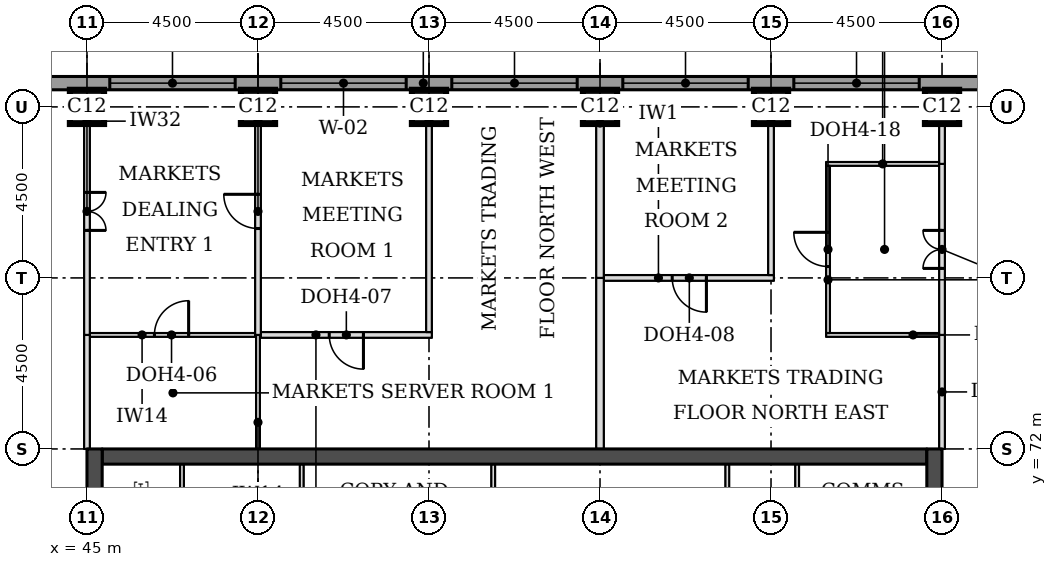
"""IFC4 building model, lengths in metres.
Left out: names, types, materials, properties, quantities, classifications, styles, units other than length and angle.
Written with IfcOpenShell. Run it as: python <this file> out.ifc"""

import sys

from ifc_helpers import new_model, si_unit, direction, frame, frame_2d, origin, origin_2d, place, context, subcontext, project, spatial, rectangle, extrude, element, fill, save


model = new_model("IFC4")
c1 = context("Model", 3, precision=1e-05, world=origin(), true_north=direction((0.0, 1.0)))
c2 = subcontext(c1, "Body", "Model", "MODEL_VIEW")
j1 = project(units=[si_unit("LENGTHUNIT", "METRE"), si_unit("PLANEANGLEUNIT", "RADIAN")], contexts=[c1])
p1 = place(None, origin())
s1 = spatial("IfcSite", under=j1, at=p1, CompositionType="ELEMENT")
p2 = place(p1, origin())
s2 = spatial("IfcBuilding", under=s1, at=p2, CompositionType="ELEMENT")
p3 = place(p2, frame((0.0, 0.0, 169.9)))
s3 = spatial("IfcBuildingStorey", under=s2, at=p3, CompositionType="ELEMENT", Elevation=169.9)
for number, where, z_axis, x_axis in (
    (1, (45.0, 81.0, 0.0), (0.0, 0.0, 1.0), (1.0, 0.0, 0.0)),
    (2, (49.5, 81.0, 0.0), (0.0, 0.0, 1.0), (1.0, 0.0, 0.0)),
    (3, (54.0, 81.0, 0.0), (0.0, 0.0, 1.0), (1.0, 0.0, 0.0)),
    (4, (58.5, 81.0, 0.0), (0.0, 0.0, 1.0), (1.0, 0.0, 0.0)),
    (5, (63.0, 81.0, 0.0), (0.0, 0.0, 1.0), (1.0, 0.0, 0.0)),
    (6, (67.5, 81.0, 0.0), (0.0, 0.0, 1.0), (1.0, 0.0, 0.0)),
):
    element("IfcColumn", number, at=place(p3, frame(where, z_axis=z_axis, x_axis=x_axis)), inside=s3, PredefinedType="COLUMN", context=c2, shape_type="SweptSolid", body=[
        extrude(rectangle(XDim=0.9, YDim=0.9, at=origin_2d()), origin(), (0.0, 0.0, 1.0), 3.7),
    ])
p4 = place(p3, frame((45.4, 71.8, 0.0), z_axis=(0.0, 0.0, 1.0), x_axis=(1.0, 0.0, 0.0)))
e7 = element("IfcWall", 7, at=p4, inside=s3, PredefinedType="SHEAR", context=c2, shape_type="SweptSolid", body=[
    extrude(rectangle(XDim=21.7, YDim=0.4, at=frame_2d((10.85, 0.0))), origin(), (0.0, 0.0, 1.0), 3.7),
])
p5 = place(p3, frame((45.2, 49.5, 0.0), z_axis=(0.0, 0.0, 1.0), x_axis=(0.0, 1.0, 0.0)))
e8 = element("IfcWall", 8, at=p5, inside=s3, PredefinedType="SHEAR", context=c2, shape_type="SweptSolid", body=[
    extrude(rectangle(XDim=22.5, YDim=0.4, at=frame_2d((11.25, 0.0))), origin(), (0.0, 0.0, 1.0), 3.7),
])
p6 = place(p5, frame((4.2, 0.0, 0.0)))
e9 = element("IfcOpeningElement", 9, at=p6, cuts=e8, PredefinedType="OPENING", context=c2, shape_type="SweptSolid", body=[
    extrude(rectangle(XDim=1.8, YDim=2.1, at=frame_2d((0.9, 1.05))), frame((0.0, 0.21, 0.0), z_axis=(0.0, -1.0, 0.0), x_axis=(1.0, 0.0, 0.0)), (0.0, 0.0, 1.0), 0.42),
])
p7 = place(p5, frame((6.9, 0.0, 0.0)))
e10 = element("IfcOpeningElement", 10, at=p7, cuts=e8, PredefinedType="OPENING", context=c2, shape_type="SweptSolid", body=[
    extrude(rectangle(XDim=1.1, YDim=2.1, at=frame_2d((0.55, 1.05))), frame((0.0, 0.21, 0.0), z_axis=(0.0, -1.0, 0.0), x_axis=(1.0, 0.0, 0.0)), (0.0, 0.0, 1.0), 0.42),
])
p8 = place(p5, frame((13.6, 0.0, 0.0)))
e11 = element("IfcOpeningElement", 11, at=p8, cuts=e8, PredefinedType="OPENING", context=c2, shape_type="SweptSolid", body=[
    extrude(rectangle(XDim=1.1, YDim=2.1, at=frame_2d((0.55, 1.05))), frame((0.0, 0.21, 0.0), z_axis=(0.0, -1.0, 0.0), x_axis=(1.0, 0.0, 0.0)), (0.0, 0.0, 1.0), 0.42),
])
p9 = place(p5, frame((16.5, 0.0, 0.0)))
e12 = element("IfcOpeningElement", 12, at=p9, cuts=e8, PredefinedType="OPENING", context=c2, shape_type="SweptSolid", body=[
    extrude(rectangle(XDim=1.8, YDim=2.1, at=frame_2d((0.9, 1.05))), frame((0.0, 0.21, 0.0), z_axis=(0.0, -1.0, 0.0), x_axis=(1.0, 0.0, 0.0)), (0.0, 0.0, 1.0), 0.42),
])
p10 = place(p3, frame((67.3, 49.5, 0.0), z_axis=(0.0, 0.0, 1.0), x_axis=(0.0, 1.0, 0.0)))
e13 = element("IfcWall", 13, at=p10, inside=s3, PredefinedType="SHEAR", context=c2, shape_type="SweptSolid", body=[
    extrude(rectangle(XDim=22.5, YDim=0.4, at=frame_2d((11.25, 0.0))), origin(), (0.0, 0.0, 1.0), 3.7),
])
p11 = place(p10, frame((4.2, 0.0, 0.0)))
e14 = element("IfcOpeningElement", 14, at=p11, cuts=e13, PredefinedType="OPENING", context=c2, shape_type="SweptSolid", body=[
    extrude(rectangle(XDim=1.8, YDim=2.1, at=frame_2d((0.9, 1.05))), frame((0.0, 0.21, 0.0), z_axis=(0.0, -1.0, 0.0), x_axis=(1.0, 0.0, 0.0)), (0.0, 0.0, 1.0), 0.42),
])
p12 = place(p10, frame((6.9, 0.0, 0.0)))
e15 = element("IfcOpeningElement", 15, at=p12, cuts=e13, PredefinedType="OPENING", context=c2, shape_type="SweptSolid", body=[
    extrude(rectangle(XDim=1.1, YDim=2.1, at=frame_2d((0.55, 1.05))), frame((0.0, 0.21, 0.0), z_axis=(0.0, -1.0, 0.0), x_axis=(1.0, 0.0, 0.0)), (0.0, 0.0, 1.0), 0.42),
])
p13 = place(p10, frame((13.6, 0.0, 0.0)))
e16 = element("IfcOpeningElement", 16, at=p13, cuts=e13, PredefinedType="OPENING", context=c2, shape_type="SweptSolid", body=[
    extrude(rectangle(XDim=1.1, YDim=2.1, at=frame_2d((0.55, 1.05))), frame((0.0, 0.21, 0.0), z_axis=(0.0, -1.0, 0.0), x_axis=(1.0, 0.0, 0.0)), (0.0, 0.0, 1.0), 0.42),
])
p14 = place(p10, frame((16.5, 0.0, 0.0)))
e17 = element("IfcOpeningElement", 17, at=p14, cuts=e13, PredefinedType="OPENING", context=c2, shape_type="SweptSolid", body=[
    extrude(rectangle(XDim=1.8, YDim=2.1, at=frame_2d((0.9, 1.05))), frame((0.0, 0.21, 0.0), z_axis=(0.0, -1.0, 0.0), x_axis=(1.0, 0.0, 0.0)), (0.0, 0.0, 1.0), 0.42),
])
p15 = place(p3, frame((72.331, 81.625, 0.0), z_axis=(0.0, 0.0, 1.0), x_axis=(-1.0, 0.0, 0.0)))
e18 = element("IfcWall", 18, at=p15, inside=s3, PredefinedType="STANDARD", context=c2, shape_type="SweptSolid", body=[
    extrude(rectangle(XDim=32.163, YDim=0.35, at=frame_2d((16.081, 0.0))), origin(), (0.0, 0.0, 1.0), 3.525),
])
p16 = place(p15, frame((5.431, 0.0, 0.9)))
e19 = element("IfcOpeningElement", 19, at=p16, cuts=e18, PredefinedType="OPENING", context=c2, shape_type="SweptSolid", body=[
    extrude(rectangle(XDim=3.3, YDim=1.9, at=frame_2d((1.65, 0.95))), frame((0.0, 0.185, 0.0), z_axis=(0.0, -1.0, 0.0), x_axis=(1.0, 0.0, 0.0)), (0.0, 0.0, 1.0), 0.37),
])
p17 = place(p15, frame((9.931, 0.0, 0.9)))
e20 = element("IfcOpeningElement", 20, at=p17, cuts=e18, PredefinedType="OPENING", context=c2, shape_type="SweptSolid", body=[
    extrude(rectangle(XDim=3.3, YDim=1.9, at=frame_2d((1.65, 0.95))), frame((0.0, 0.185, 0.0), z_axis=(0.0, -1.0, 0.0), x_axis=(1.0, 0.0, 0.0)), (0.0, 0.0, 1.0), 0.37),
])
p18 = place(p15, frame((14.431, 0.0, 0.9)))
e21 = element("IfcOpeningElement", 21, at=p18, cuts=e18, PredefinedType="OPENING", context=c2, shape_type="SweptSolid", body=[
    extrude(rectangle(XDim=3.3, YDim=1.9, at=frame_2d((1.65, 0.95))), frame((0.0, 0.185, 0.0), z_axis=(0.0, -1.0, 0.0), x_axis=(1.0, 0.0, 0.0)), (0.0, 0.0, 1.0), 0.37),
])
p19 = place(p15, frame((18.931, 0.0, 0.9)))
e22 = element("IfcOpeningElement", 22, at=p19, cuts=e18, PredefinedType="OPENING", context=c2, shape_type="SweptSolid", body=[
    extrude(rectangle(XDim=3.3, YDim=1.9, at=frame_2d((1.65, 0.95))), frame((0.0, 0.185, 0.0), z_axis=(0.0, -1.0, 0.0), x_axis=(1.0, 0.0, 0.0)), (0.0, 0.0, 1.0), 0.37),
])
p20 = place(p15, frame((23.431, 0.0, 0.9)))
e23 = element("IfcOpeningElement", 23, at=p20, cuts=e18, PredefinedType="OPENING", context=c2, shape_type="SweptSolid", body=[
    extrude(rectangle(XDim=3.3, YDim=1.9, at=frame_2d((1.65, 0.95))), frame((0.0, 0.185, 0.0), z_axis=(0.0, -1.0, 0.0), x_axis=(1.0, 0.0, 0.0)), (0.0, 0.0, 1.0), 0.37),
])
p21 = place(p3, frame((45.075, 75.0, 0.0), z_axis=(0.0, 0.0, 1.0), x_axis=(1.0, 0.0, 0.0)))
e24 = element("IfcWall", 24, at=p21, inside=s3, PredefinedType="PARTITIONING", context=c2, shape_type="SweptSolid", body=[
    extrude(rectangle(XDim=4.35, YDim=0.1, at=frame_2d((2.175, 0.0))), origin(), (0.0, 0.0, 1.0), 3.55),
])
p22 = place(p21, frame((1.7, 0.0, 0.0)))
e25 = element("IfcOpeningElement", 25, at=p22, cuts=e24, PredefinedType="OPENING", context=c2, shape_type="SweptSolid", body=[
    extrude(rectangle(XDim=0.9, YDim=2.1, at=frame_2d((0.45, 1.05))), frame((0.0, 0.06, 0.0), z_axis=(0.0, -1.0, 0.0), x_axis=(1.0, 0.0, 0.0)), (0.0, 0.0, 1.0), 0.12),
])
p23 = place(p3, frame((49.575, 75.0, 0.0), z_axis=(0.0, 0.0, 1.0), x_axis=(1.0, 0.0, 0.0)))
e26 = element("IfcWall", 26, at=p23, inside=s3, PredefinedType="PARTITIONING", context=c2, shape_type="SweptSolid", body=[
    extrude(rectangle(XDim=4.5, YDim=0.15, at=frame_2d((2.25, 0.0))), origin(), (0.0, 0.0, 1.0), 3.55),
])
p24 = place(p23, frame((1.8, 0.0, 0.0)))
e27 = element("IfcOpeningElement", 27, at=p24, cuts=e26, PredefinedType="OPENING", context=c2, shape_type="SweptSolid", body=[
    extrude(rectangle(XDim=0.9, YDim=2.1, at=frame_2d((0.45, 1.05))), frame((0.0, 0.085, 0.0), z_axis=(0.0, -1.0, 0.0), x_axis=(1.0, 0.0, 0.0)), (0.0, 0.0, 1.0), 0.17),
])
p25 = place(p3, frame((64.45, 75.0, 0.0), z_axis=(0.0, 0.0, 1.0), x_axis=(1.0, 0.0, 0.0)))
e28 = element("IfcWall", 28, at=p25, inside=s3, PredefinedType="PARTITIONING", context=c2, shape_type="SweptSolid", body=[
    extrude(rectangle(XDim=2.975, YDim=0.1, at=frame_2d((1.488, 0.0))), origin(), (0.0, 0.0, 1.0), 3.55),
])
p26 = place(p3, frame((58.6, 76.5, 0.0), z_axis=(0.0, 0.0, 1.0), x_axis=(1.0, 0.0, 0.0)))
e29 = element("IfcWall", 29, at=p26, inside=s3, PredefinedType="PARTITIONING", context=c2, shape_type="SweptSolid", body=[
    extrude(rectangle(XDim=4.475, YDim=0.15, at=frame_2d((2.237, 0.0))), origin(), (0.0, 0.0, 1.0), 3.55),
])
p27 = place(p26, frame((1.8, 0.0, 0.0)))
e30 = element("IfcOpeningElement", 30, at=p27, cuts=e29, PredefinedType="OPENING", context=c2, shape_type="SweptSolid", body=[
    extrude(rectangle(XDim=0.9, YDim=2.1, at=frame_2d((0.45, 1.05))), frame((0.0, 0.085, 0.0), z_axis=(0.0, -1.0, 0.0), x_axis=(1.0, 0.0, 0.0)), (0.0, 0.0, 1.0), 0.17),
])
p28 = place(p3, frame((64.45, 79.5, 0.0), z_axis=(0.0, 0.0, 1.0), x_axis=(1.0, 0.0, 0.0)))
e31 = element("IfcWall", 31, at=p28, inside=s3, PredefinedType="PARTITIONING", context=c2, shape_type="SweptSolid", body=[
    extrude(rectangle(XDim=2.975, YDim=0.1, at=frame_2d((1.488, 0.0))), origin(), (0.0, 0.0, 1.0), 3.55),
])
p29 = place(p3, frame((45.0, 72.0, 0.0), z_axis=(0.0, 0.0, 1.0), x_axis=(0.0, 1.0, 0.0)))
e32 = element("IfcWall", 32, at=p29, inside=s3, PredefinedType="PARTITIONING", context=c2, shape_type="SweptSolid", body=[
    extrude(rectangle(XDim=3.0, YDim=0.15, at=frame_2d((1.5, 0.0))), origin(), (0.0, 0.0, 1.0), 3.022),
])
p30 = place(p3, frame((49.5, 72.0, 0.0), z_axis=(0.0, 0.0, 1.0), x_axis=(0.0, 1.0, 0.0)))
e33 = element("IfcWall", 33, at=p30, inside=s3, PredefinedType="PARTITIONING", context=c2, shape_type="SweptSolid", body=[
    extrude(rectangle(XDim=3.0, YDim=0.1, at=frame_2d((1.5, 0.0))), origin(), (0.0, 0.0, 1.0), 3.55),
])
p31 = place(p3, frame((58.5, 72.0, 0.0), z_axis=(0.0, 0.0, 1.0), x_axis=(0.0, 1.0, 0.0)))
e34 = element("IfcWall", 34, at=p31, inside=s3, PredefinedType="PARTITIONING", context=c2, shape_type="SweptSolid", body=[
    extrude(rectangle(XDim=4.5, YDim=0.2, at=frame_2d((2.25, 0.0))), origin(), (0.0, 0.0, 1.0), 3.55),
])
p32 = place(p3, frame((67.5, 72.0, 0.0), z_axis=(0.0, 0.0, 1.0), x_axis=(0.0, 1.0, 0.0)))
e35 = element("IfcWall", 35, at=p32, inside=s3, PredefinedType="PARTITIONING", context=c2, shape_type="SweptSolid", body=[
    extrude(rectangle(XDim=3.0, YDim=0.15, at=frame_2d((1.5, 0.0))), origin(), (0.0, 0.0, 1.0), 3.022),
])
p33 = place(p3, frame((45.0, 75.0, 0.0), z_axis=(0.0, 0.0, 1.0), x_axis=(0.0, 1.0, 0.0)))
e36 = element("IfcWall", 36, at=p33, inside=s3, PredefinedType="PARTITIONING", context=c2, shape_type="SweptSolid", body=[
    extrude(rectangle(XDim=6.45, YDim=0.15, at=frame_2d((3.225, 0.0))), origin(), (0.0, 0.0, 1.0), 3.022),
])
p34 = place(p33, frame((2.75, 0.0, 0.0)))
e37 = element("IfcOpeningElement", 37, at=p34, cuts=e36, PredefinedType="OPENING", context=c2, shape_type="SweptSolid", body=[
    extrude(rectangle(XDim=1.0, YDim=2.1, at=frame_2d((0.5, 1.05))), frame((0.0, 0.085, 0.0), z_axis=(0.0, -1.0, 0.0), x_axis=(1.0, 0.0, 0.0)), (0.0, 0.0, 1.0), 0.17),
])
p35 = place(p3, frame((49.5, 75.0, 0.0), z_axis=(0.0, 0.0, 1.0), x_axis=(0.0, 1.0, 0.0)))
e38 = element("IfcWall", 38, at=p35, inside=s3, PredefinedType="PARTITIONING", context=c2, shape_type="SweptSolid", body=[
    extrude(rectangle(XDim=6.45, YDim=0.15, at=frame_2d((3.225, 0.0))), origin(), (0.0, 0.0, 1.0), 3.55),
])
p36 = place(p35, frame((2.8, 0.0, 0.0)))
e39 = element("IfcOpeningElement", 39, at=p36, cuts=e38, PredefinedType="OPENING", context=c2, shape_type="SweptSolid", body=[
    extrude(rectangle(XDim=0.9, YDim=2.1, at=frame_2d((0.45, 1.05))), frame((0.0, 0.085, 0.0), z_axis=(0.0, -1.0, 0.0), x_axis=(1.0, 0.0, 0.0)), (0.0, 0.0, 1.0), 0.17),
])
p37 = place(p3, frame((67.5, 75.0, 0.0), z_axis=(0.0, 0.0, 1.0), x_axis=(0.0, 1.0, 0.0)))
e40 = element("IfcWall", 40, at=p37, inside=s3, PredefinedType="PARTITIONING", context=c2, shape_type="SweptSolid", body=[
    extrude(rectangle(XDim=4.5, YDim=0.15, at=frame_2d((2.25, 0.0))), origin(), (0.0, 0.0, 1.0), 3.022),
])
p38 = place(p37, frame((1.75, 0.0, 0.0)))
e41 = element("IfcOpeningElement", 41, at=p38, cuts=e40, PredefinedType="OPENING", context=c2, shape_type="SweptSolid", body=[
    extrude(rectangle(XDim=1.0, YDim=2.1, at=frame_2d((0.5, 1.05))), frame((0.0, 0.085, 0.0), z_axis=(0.0, -1.0, 0.0), x_axis=(1.0, 0.0, 0.0)), (0.0, 0.0, 1.0), 0.17),
])
p39 = place(p3, frame((64.5, 75.05, 0.0), z_axis=(0.0, 0.0, 1.0), x_axis=(0.0, 1.0, 0.0)))
e42 = element("IfcWall", 42, at=p39, inside=s3, PredefinedType="PARTITIONING", context=c2, shape_type="SweptSolid", body=[
    extrude(rectangle(XDim=4.4, YDim=0.1, at=frame_2d((2.2, 0.0))), origin(), (0.0, 0.0, 1.0), 3.55),
])
p40 = place(p39, frame((1.75, 0.0, 0.0)))
e43 = element("IfcOpeningElement", 43, at=p40, cuts=e42, PredefinedType="OPENING", context=c2, shape_type="SweptSolid", body=[
    extrude(rectangle(XDim=0.9, YDim=2.1, at=frame_2d((0.45, 1.05))), frame((0.0, 0.06, 0.0), z_axis=(0.0, -1.0, 0.0), x_axis=(1.0, 0.0, 0.0)), (0.0, 0.0, 1.0), 0.12),
])
p41 = place(p3, frame((54.0, 75.075, 0.0), z_axis=(0.0, 0.0, 1.0), x_axis=(0.0, 1.0, 0.0)))
e44 = element("IfcWall", 44, at=p41, inside=s3, PredefinedType="PARTITIONING", context=c2, shape_type="SweptSolid", body=[
    extrude(rectangle(XDim=6.375, YDim=0.15, at=frame_2d((3.188, 0.0))), origin(), (0.0, 0.0, 1.0), 3.55),
])
p42 = place(p3, frame((58.5, 76.5, 0.0), z_axis=(0.0, 0.0, 1.0), x_axis=(0.0, 1.0, 0.0)))
e45 = element("IfcWall", 45, at=p42, inside=s3, PredefinedType="PARTITIONING", context=c2, shape_type="SweptSolid", body=[
    extrude(rectangle(XDim=4.95, YDim=0.2, at=frame_2d((2.475, 0.0))), origin(), (0.0, 0.0, 1.0), 3.55),
])
p43 = place(p3, frame((63.0, 76.575, 0.0), z_axis=(0.0, 0.0, 1.0), x_axis=(0.0, 1.0, 0.0)))
e46 = element("IfcWall", 46, at=p43, inside=s3, PredefinedType="PARTITIONING", context=c2, shape_type="SweptSolid", body=[
    extrude(rectangle(XDim=4.875, YDim=0.15, at=frame_2d((2.438, 0.0))), origin(), (0.0, 0.0, 1.0), 3.55),
])
p44 = place(p3, frame((67.5, 79.5, 0.0), z_axis=(0.0, 0.0, 1.0), x_axis=(0.0, 1.0, 0.0)))
e47 = element("IfcWall", 47, at=p44, inside=s3, PredefinedType="PARTITIONING", context=c2, shape_type="SweptSolid", body=[
    extrude(rectangle(XDim=1.95, YDim=0.15, at=frame_2d((0.975, 0.0))), origin(), (0.0, 0.0, 1.0), 3.022),
])
for number, where, z_axis, x_axis in (
    (48, (47.5, 68.5, 0.0), (0.0, 0.0, 1.0), (0.0, 1.0, 0.0)),
    (49, (50.65, 68.5, 0.0), (0.0, 0.0, 1.0), (0.0, 1.0, 0.0)),
    (50, (55.69, 68.5, 0.0), (0.0, 0.0, 1.0), (0.0, 1.0, 0.0)),
    (51, (61.85, 68.5, 0.0), (0.0, 0.0, 1.0), (0.0, 1.0, 0.0)),
    (52, (63.688, 68.5, 0.0), (0.0, 0.0, 1.0), (0.0, 1.0, 0.0)),
):
    element("IfcWall", number, at=place(p3, frame(where, z_axis=z_axis, x_axis=x_axis)), inside=s3, PredefinedType="PARTITIONING", context=c2, shape_type="SweptSolid", body=[
        extrude(rectangle(XDim=3.1, YDim=0.1, at=frame_2d((1.55, 0.0))), origin(), (0.0, 0.0, 1.0), 3.55),
    ])
p45 = place(p16, origin())
e53 = element("IfcWindow", 53, at=p45, inside=s3, PartitioningType="SINGLE_PANEL", PredefinedType="WINDOW", context=c2, shape_type="SweptSolid", body=[
    extrude(rectangle(XDim=3.3, YDim=1.9, at=frame_2d((1.65, 0.95))), frame((0.0, 0.085, 0.0), z_axis=(0.0, -1.0, 0.0), x_axis=(1.0, 0.0, 0.0)), (0.0, 0.0, 1.0), 0.06),
])
fill(e19, e53)
p46 = place(p17, origin())
e54 = element("IfcWindow", 54, at=p46, inside=s3, PartitioningType="SINGLE_PANEL", PredefinedType="WINDOW", context=c2, shape_type="SweptSolid", body=[
    extrude(rectangle(XDim=3.3, YDim=1.9, at=frame_2d((1.65, 0.95))), frame((0.0, 0.085, 0.0), z_axis=(0.0, -1.0, 0.0), x_axis=(1.0, 0.0, 0.0)), (0.0, 0.0, 1.0), 0.06),
])
fill(e20, e54)
p47 = place(p18, origin())
e55 = element("IfcWindow", 55, at=p47, inside=s3, PartitioningType="SINGLE_PANEL", PredefinedType="WINDOW", context=c2, shape_type="SweptSolid", body=[
    extrude(rectangle(XDim=3.3, YDim=1.9, at=frame_2d((1.65, 0.95))), frame((0.0, 0.085, 0.0), z_axis=(0.0, -1.0, 0.0), x_axis=(1.0, 0.0, 0.0)), (0.0, 0.0, 1.0), 0.06),
])
fill(e21, e55)
p48 = place(p19, origin())
e56 = element("IfcWindow", 56, at=p48, inside=s3, PartitioningType="SINGLE_PANEL", PredefinedType="WINDOW", context=c2, shape_type="SweptSolid", body=[
    extrude(rectangle(XDim=3.3, YDim=1.9, at=frame_2d((1.65, 0.95))), frame((0.0, 0.085, 0.0), z_axis=(0.0, -1.0, 0.0), x_axis=(1.0, 0.0, 0.0)), (0.0, 0.0, 1.0), 0.06),
])
fill(e22, e56)
p49 = place(p20, origin())
e57 = element("IfcWindow", 57, at=p49, inside=s3, PartitioningType="SINGLE_PANEL", PredefinedType="WINDOW", context=c2, shape_type="SweptSolid", body=[
    extrude(rectangle(XDim=3.3, YDim=1.9, at=frame_2d((1.65, 0.95))), frame((0.0, 0.085, 0.0), z_axis=(0.0, -1.0, 0.0), x_axis=(1.0, 0.0, 0.0)), (0.0, 0.0, 1.0), 0.06),
])
fill(e23, e57)
p50 = place(p34, frame((1.0, 0.0, 0.0), z_axis=(0.0, 0.0, 1.0), x_axis=(-1.0, 0.0, 0.0)))
e58 = element("IfcDoor", 58, at=p50, inside=s3, OperationType="DOUBLE_DOOR_SINGLE_SWING", PredefinedType="DOOR", context=c2, shape_type="SweptSolid", body=[
    extrude(rectangle(XDim=1.0, YDim=2.1, at=frame_2d((0.5, 1.05))), frame((0.0, 0.025, 0.0), z_axis=(0.0, -1.0, 0.0), x_axis=(1.0, 0.0, 0.0)), (0.0, 0.0, 1.0), 0.05),
])
fill(e37, e58)
p51 = place(p36, origin())
e59 = element("IfcDoor", 59, at=p51, inside=s3, OperationType="SINGLE_SWING_RIGHT", PredefinedType="DOOR", context=c2, shape_type="SweptSolid", body=[
    extrude(rectangle(XDim=0.9, YDim=2.1, at=frame_2d((0.45, 1.05))), frame((0.0, 0.025, 0.0), z_axis=(0.0, -1.0, 0.0), x_axis=(1.0, 0.0, 0.0)), (0.0, 0.0, 1.0), 0.05),
])
fill(e39, e59)
p52 = place(p22, origin())
e60 = element("IfcDoor", 60, at=p52, inside=s3, OperationType="SINGLE_SWING_RIGHT", PredefinedType="DOOR", context=c2, shape_type="SweptSolid", body=[
    extrude(rectangle(XDim=0.9, YDim=2.1, at=frame_2d((0.45, 1.05))), frame((0.0, 0.025, 0.0), z_axis=(0.0, -1.0, 0.0), x_axis=(1.0, 0.0, 0.0)), (0.0, 0.0, 1.0), 0.05),
])
fill(e25, e60)
p53 = place(p24, frame((0.9, 0.0, 0.0), z_axis=(0.0, 0.0, 1.0), x_axis=(-1.0, 0.0, 0.0)))
e61 = element("IfcDoor", 61, at=p53, inside=s3, OperationType="SINGLE_SWING_LEFT", PredefinedType="DOOR", context=c2, shape_type="SweptSolid", body=[
    extrude(rectangle(XDim=0.9, YDim=2.1, at=frame_2d((0.45, 1.05))), frame((0.0, 0.025, 0.0), z_axis=(0.0, -1.0, 0.0), x_axis=(1.0, 0.0, 0.0)), (0.0, 0.0, 1.0), 0.05),
])
fill(e27, e61)
p54 = place(p38, origin())
e62 = element("IfcDoor", 62, at=p54, inside=s3, OperationType="DOUBLE_DOOR_SINGLE_SWING", PredefinedType="DOOR", context=c2, shape_type="SweptSolid", body=[
    extrude(rectangle(XDim=1.0, YDim=2.1, at=frame_2d((0.5, 1.05))), frame((0.0, 0.025, 0.0), z_axis=(0.0, -1.0, 0.0), x_axis=(1.0, 0.0, 0.0)), (0.0, 0.0, 1.0), 0.05),
])
fill(e41, e62)
p55 = place(p40, origin())
e63 = element("IfcDoor", 63, at=p55, inside=s3, OperationType="SINGLE_SWING_RIGHT", PredefinedType="DOOR", context=c2, shape_type="SweptSolid", body=[
    extrude(rectangle(XDim=0.9, YDim=2.1, at=frame_2d((0.45, 1.05))), frame((0.0, 0.025, 0.0), z_axis=(0.0, -1.0, 0.0), x_axis=(1.0, 0.0, 0.0)), (0.0, 0.0, 1.0), 0.05),
])
fill(e43, e63)
p56 = place(p27, frame((0.9, 0.0, 0.0), z_axis=(0.0, 0.0, 1.0), x_axis=(-1.0, 0.0, 0.0)))
e64 = element("IfcDoor", 64, at=p56, inside=s3, OperationType="SINGLE_SWING_LEFT", PredefinedType="DOOR", context=c2, shape_type="SweptSolid", body=[
    extrude(rectangle(XDim=0.9, YDim=2.1, at=frame_2d((0.45, 1.05))), frame((0.0, 0.025, 0.0), z_axis=(0.0, -1.0, 0.0), x_axis=(1.0, 0.0, 0.0)), (0.0, 0.0, 1.0), 0.05),
])
fill(e30, e64)
save(model, sys.argv[1])
